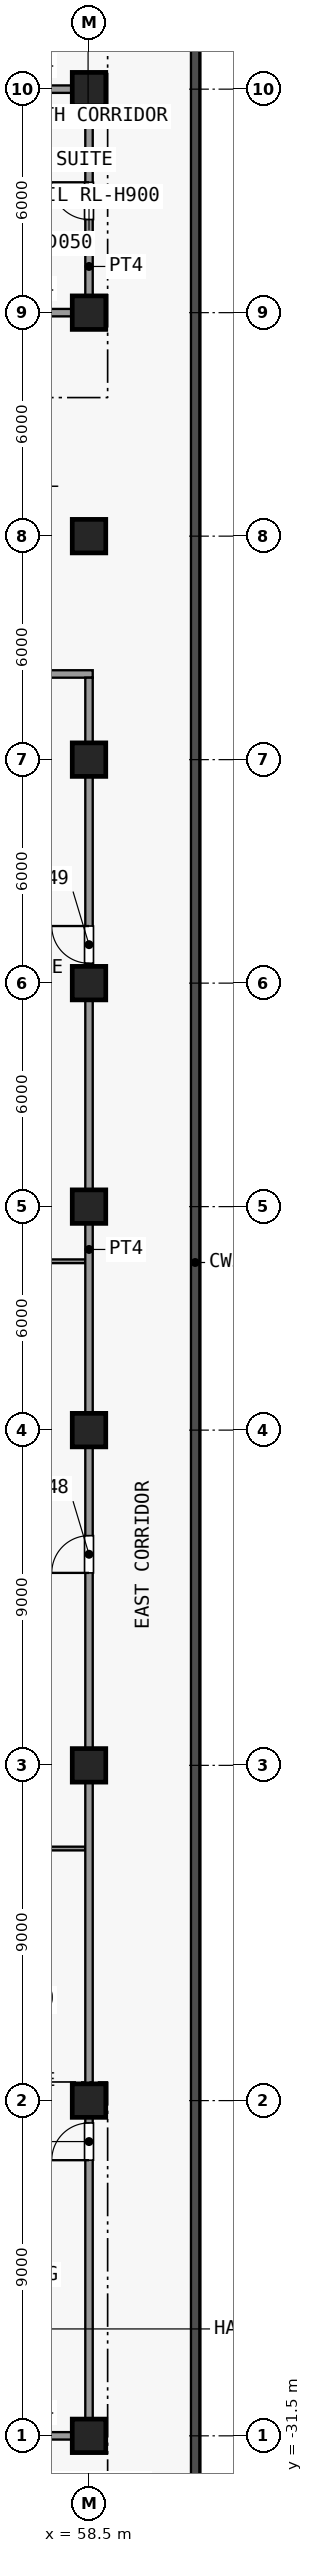
"""IFC4 building model, lengths in metres.
Left out: names, types, materials, properties, quantities, classifications, styles, units other than length and angle.
Written with IfcOpenShell. Run it as: python <this file> out.ifc"""

import sys

from ifc_helpers import new_model, si_unit, direction, frame, frame_2d, origin, origin_2d, place, context, subcontext, project, spatial, rectangle, extrude, element, fill, save


model = new_model("IFC4")
c1 = context("Model", 3, precision=1e-05, world=origin(), true_north=direction((0.0, 1.0)))
c2 = subcontext(c1, "Body", "Model", "MODEL_VIEW")
j1 = project(units=[si_unit("LENGTHUNIT", "METRE"), si_unit("PLANEANGLEUNIT", "RADIAN")], contexts=[c1])
p1 = place(None, origin())
s1 = spatial("IfcSite", under=j1, at=p1, CompositionType="ELEMENT")
p2 = place(p1, origin())
s2 = spatial("IfcBuilding", under=s1, at=p2, CompositionType="ELEMENT")
p3 = place(p2, frame((0.0, 0.0, 18.5)))
s3 = spatial("IfcBuildingStorey", under=s2, at=p3, CompositionType="ELEMENT", Elevation=18.5)
for number, where, z_axis, x_axis in (
    (1, (58.5, -31.5, 0.0), (0.0, 0.0, 1.0), (1.0, 0.0, 0.0)),
    (2, (58.5, -22.5, 0.0), (0.0, 0.0, 1.0), (1.0, 0.0, 0.0)),
    (3, (58.5, -13.5, 0.0), (0.0, 0.0, 1.0), (1.0, 0.0, 0.0)),
    (4, (58.5, -4.5, 0.0), (0.0, 0.0, 1.0), (1.0, 0.0, 0.0)),
    (5, (58.5, 1.5, 0.0), (0.0, 0.0, 1.0), (1.0, 0.0, 0.0)),
    (6, (58.5, 7.5, 0.0), (0.0, 0.0, 1.0), (1.0, 0.0, 0.0)),
    (7, (58.5, 13.5, 0.0), (0.0, 0.0, 1.0), (1.0, 0.0, 0.0)),
    (8, (58.5, 19.5, 0.0), (0.0, 0.0, 1.0), (1.0, 0.0, 0.0)),
    (9, (58.5, 25.5, 0.0), (0.0, 0.0, 1.0), (1.0, 0.0, 0.0)),
    (10, (58.5, 31.5, 0.0), (0.0, 0.0, 1.0), (1.0, 0.0, 0.0)),
):
    element("IfcColumn", number, at=place(p3, frame(where, z_axis=z_axis, x_axis=x_axis)), inside=s3, PredefinedType="COLUMN", context=c2, shape_type="SweptSolid", body=[
        extrude(rectangle(XDim=0.9, YDim=0.9, at=origin_2d()), origin(), (0.0, 0.0, 1.0), 5.0),
    ])
p4 = place(p3, frame((55.6, -31.5, 0.0), z_axis=(0.0, 0.0, 1.0), x_axis=(1.0, 0.0, 0.0)))
e11 = element("IfcWall", 11, at=p4, inside=s3, PredefinedType="PARTITIONING", context=c2, shape_type="SweptSolid", body=[
    extrude(rectangle(XDim=3.0, YDim=0.2, at=frame_2d((1.5, 0.0))), origin(), (0.0, 0.0, 1.0), 4.65),
])
for number, where, z_axis, x_axis in (
    (12, (52.6, -15.733, 0.0), (0.0, 0.0, 1.0), (1.0, 0.0, 0.0)),
    (13, (52.6, 0.033, 0.0), (0.0, 0.0, 1.0), (1.0, 0.0, 0.0)),
):
    element("IfcWall", number, at=place(p3, frame(where, z_axis=z_axis, x_axis=x_axis)), inside=s3, PredefinedType="PARTITIONING", context=c2, shape_type="SweptSolid", body=[
        extrude(rectangle(XDim=5.8, YDim=0.1, at=frame_2d((2.9, 0.0))), origin(), (0.0, 0.0, 1.0), 4.65),
    ])
p5 = place(p3, frame((52.4, 15.8, 0.0), z_axis=(0.0, 0.0, 1.0), x_axis=(1.0, 0.0, 0.0)))
e14 = element("IfcWall", 14, at=p5, inside=s3, PredefinedType="PARTITIONING", context=c2, shape_type="SweptSolid", body=[
    extrude(rectangle(XDim=6.2, YDim=0.2, at=frame_2d((3.1, 0.0))), origin(), (0.0, 0.0, 1.0), 4.65),
])
for number, where, z_axis, x_axis in (
    (15, (55.6, 25.5, 0.0), (0.0, 0.0, 1.0), (1.0, 0.0, 0.0)),
    (16, (55.6, 31.5, 0.0), (0.0, 0.0, 1.0), (1.0, 0.0, 0.0)),
):
    element("IfcWall", number, at=place(p3, frame(where, z_axis=z_axis, x_axis=x_axis)), inside=s3, PredefinedType="PARTITIONING", context=c2, shape_type="SweptSolid", body=[
        extrude(rectangle(XDim=3.0, YDim=0.2, at=frame_2d((1.5, 0.0))), origin(), (0.0, 0.0, 1.0), 4.65),
    ])
p6 = place(p3, frame((58.5, -31.4, 0.0), z_axis=(0.0, 0.0, 1.0), x_axis=(0.0, 1.0, 0.0)))
e17 = element("IfcWall", 17, at=p6, inside=s3, PredefinedType="PARTITIONING", context=c2, shape_type="SweptSolid", body=[
    extrude(rectangle(XDim=47.1, YDim=0.2, at=frame_2d((23.55, 0.0))), origin(), (0.0, 0.0, 1.0), 4.65),
])
p7 = place(p6, frame((7.3, 0.0, 0.0)))
e18 = element("IfcOpeningElement", 18, at=p7, cuts=e17, PredefinedType="OPENING", context=c2, shape_type="SweptSolid", body=[
    extrude(rectangle(XDim=1.0, YDim=2.1, at=frame_2d((0.5, 1.05))), frame((0.0, 0.11, 0.0), z_axis=(0.0, -1.0, 0.0), x_axis=(1.0, 0.0, 0.0)), (0.0, 0.0, 1.0), 0.22),
])
p8 = place(p6, frame((23.067, 0.0, 0.0)))
e19 = element("IfcOpeningElement", 19, at=p8, cuts=e17, PredefinedType="OPENING", context=c2, shape_type="SweptSolid", body=[
    extrude(rectangle(XDim=1.0, YDim=2.1, at=frame_2d((0.5, 1.05))), frame((0.0, 0.11, 0.0), z_axis=(0.0, -1.0, 0.0), x_axis=(1.0, 0.0, 0.0)), (0.0, 0.0, 1.0), 0.22),
])
p9 = place(p6, frame((39.433, 0.0, 0.0)))
e20 = element("IfcOpeningElement", 20, at=p9, cuts=e17, PredefinedType="OPENING", context=c2, shape_type="SweptSolid", body=[
    extrude(rectangle(XDim=1.0, YDim=2.1, at=frame_2d((0.5, 1.05))), frame((0.0, 0.11, 0.0), z_axis=(0.0, -1.0, 0.0), x_axis=(1.0, 0.0, 0.0)), (0.0, 0.0, 1.0), 0.22),
])
p10 = place(p3, frame((58.5, 25.6, 0.0), z_axis=(0.0, 0.0, 1.0), x_axis=(0.0, 1.0, 0.0)))
e21 = element("IfcWall", 21, at=p10, inside=s3, PredefinedType="PARTITIONING", context=c2, shape_type="SweptSolid", body=[
    extrude(rectangle(XDim=5.8, YDim=0.2, at=frame_2d((2.9, 0.0))), origin(), (0.0, 0.0, 1.0), 4.65),
])
p11 = place(p10, frame((2.4, 0.0, 0.0)))
e22 = element("IfcOpeningElement", 22, at=p11, cuts=e21, PredefinedType="OPENING", context=c2, shape_type="SweptSolid", body=[
    extrude(rectangle(XDim=1.0, YDim=2.1, at=frame_2d((0.5, 1.05))), frame((0.0, 0.11, 0.0), z_axis=(0.0, -1.0, 0.0), x_axis=(1.0, 0.0, 0.0)), (0.0, 0.0, 1.0), 0.22),
])
p12 = place(p7, origin())
e23 = element("IfcDoor", 23, at=p12, inside=s3, OperationType="SINGLE_SWING_RIGHT", PredefinedType="DOOR", context=c2, shape_type="SweptSolid", body=[
    extrude(rectangle(XDim=1.0, YDim=2.1, at=frame_2d((0.5, 1.05))), frame((0.0, 0.025, 0.0), z_axis=(0.0, -1.0, 0.0), x_axis=(1.0, 0.0, 0.0)), (0.0, 0.0, 1.0), 0.05),
])
fill(e18, e23)
p13 = place(p8, origin())
e24 = element("IfcDoor", 24, at=p13, inside=s3, OperationType="SINGLE_SWING_RIGHT", PredefinedType="DOOR", context=c2, shape_type="SweptSolid", body=[
    extrude(rectangle(XDim=1.0, YDim=2.1, at=frame_2d((0.5, 1.05))), frame((0.0, 0.025, 0.0), z_axis=(0.0, -1.0, 0.0), x_axis=(1.0, 0.0, 0.0)), (0.0, 0.0, 1.0), 0.05),
])
fill(e19, e24)
p14 = place(p9, origin())
e25 = element("IfcDoor", 25, at=p14, inside=s3, OperationType="SINGLE_SWING_LEFT", PredefinedType="DOOR", context=c2, shape_type="SweptSolid", body=[
    extrude(rectangle(XDim=1.0, YDim=2.1, at=frame_2d((0.5, 1.05))), frame((0.0, 0.025, 0.0), z_axis=(0.0, -1.0, 0.0), x_axis=(1.0, 0.0, 0.0)), (0.0, 0.0, 1.0), 0.05),
])
fill(e20, e25)
p15 = place(p11, origin())
e26 = element("IfcDoor", 26, at=p15, inside=s3, OperationType="SINGLE_SWING_LEFT", PredefinedType="DOOR", context=c2, shape_type="SweptSolid", body=[
    extrude(rectangle(XDim=1.0, YDim=2.1, at=frame_2d((0.5, 1.05))), frame((0.0, 0.025, 0.0), z_axis=(0.0, -1.0, 0.0), x_axis=(1.0, 0.0, 0.0)), (0.0, 0.0, 1.0), 0.05),
])
fill(e22, e26)
save(model, sys.argv[1])
